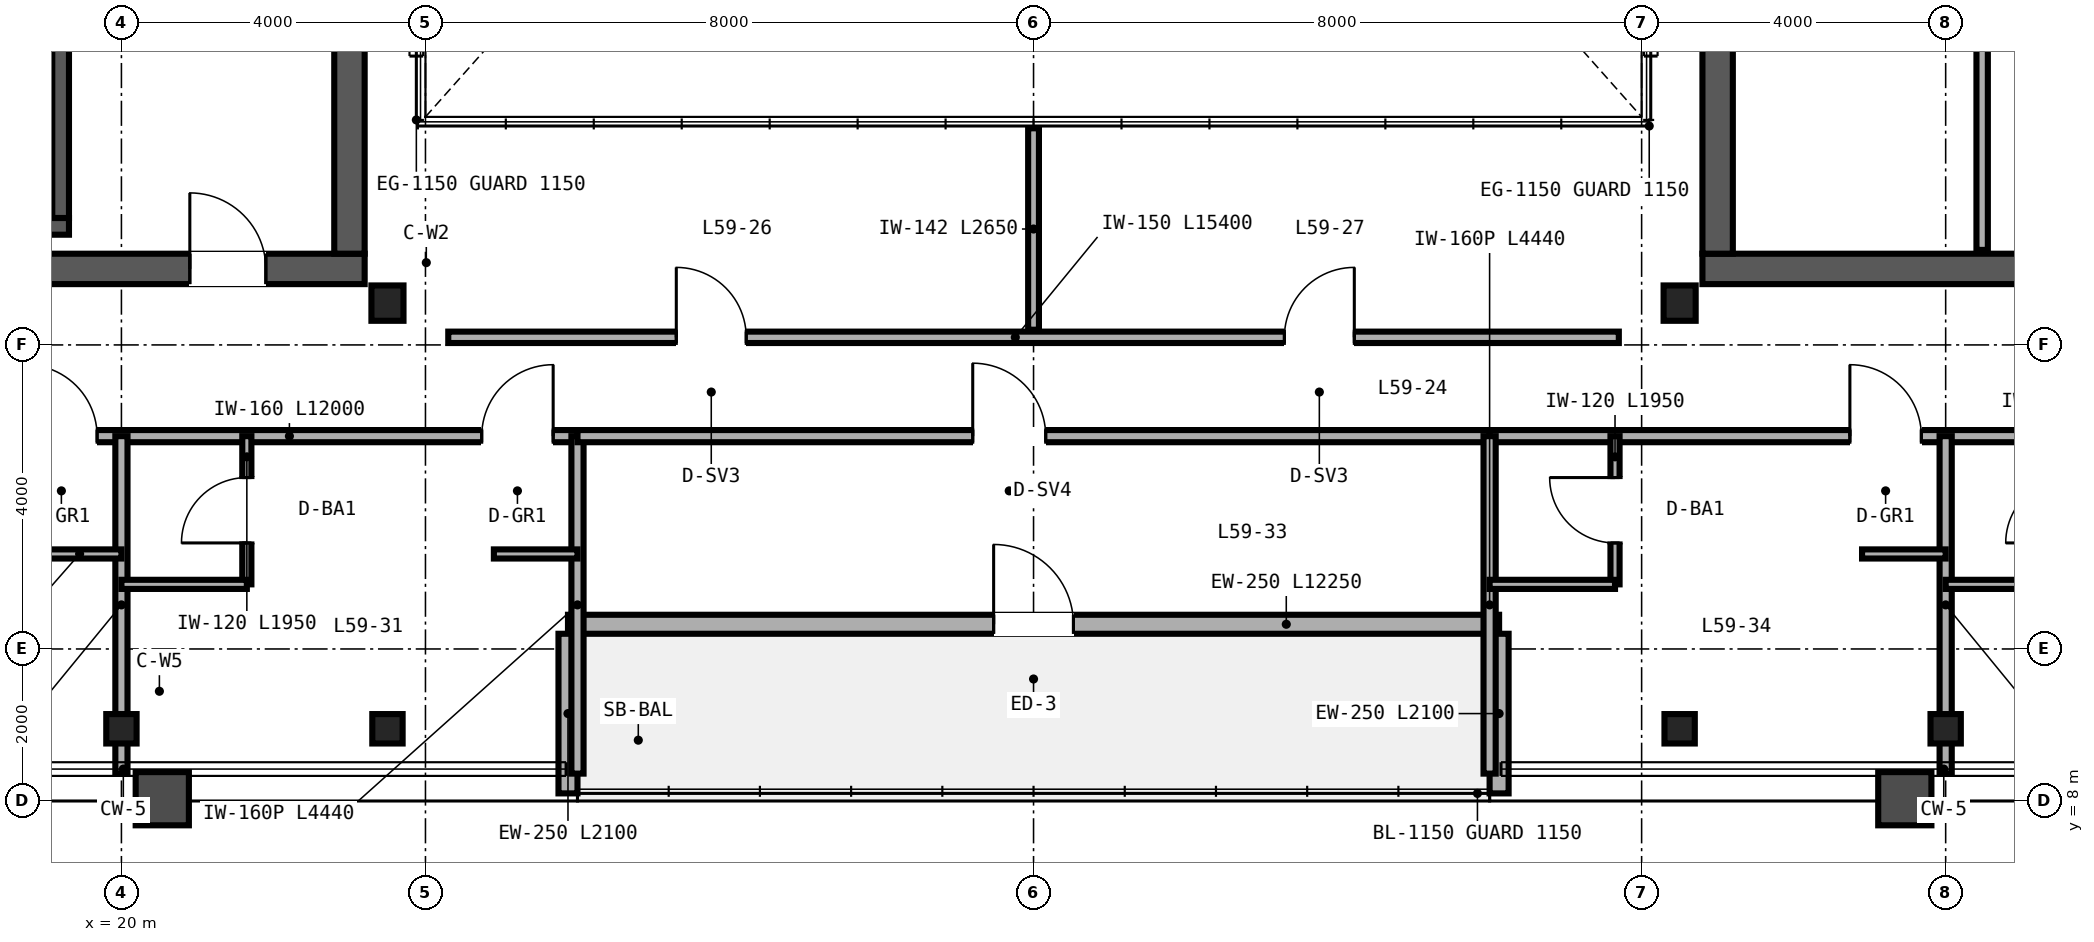
"""IFC4 building model, lengths in metres.
Left out: names, types, materials, properties, quantities, classifications, styles, units other than length and angle.
Written with IfcOpenShell. Run it as: python <this file> out.ifc"""

import sys

from ifc_helpers import new_model, si_unit, direction, frame, frame_2d, origin, origin_2d, place, context, subcontext, project, spatial, rectangle, i_section, extrude, source, transform, mapped, element, fill, save


model = new_model("IFC4")
c1 = context("Model", 3, precision=1e-05, world=origin(), true_north=direction((0.0, 1.0)))
c2 = subcontext(c1, "Body", "Model", "MODEL_VIEW")
j1 = project(units=[si_unit("LENGTHUNIT", "METRE"), si_unit("PLANEANGLEUNIT", "RADIAN")], contexts=[c1])
p1 = place(None, origin())
s1 = spatial("IfcSite", under=j1, at=p1, CompositionType="ELEMENT")
p2 = place(p1, origin())
s2 = spatial("IfcBuilding", under=s1, at=p2, CompositionType="ELEMENT")
p3 = place(p2, frame((0.0, 0.0, 236.4)))
s3 = spatial("IfcBuildingStorey", under=s2, at=p3, CompositionType="ELEMENT", Elevation=236.4)
p4 = place(p3, frame((10.8, 15.0, 0.0), z_axis=(0.0, 0.0, 1.0), x_axis=(1.0, 0.0, 0.0)))
e1 = element("IfcWall", 1, at=p4, inside=s3, PredefinedType="SHEAR", context=c2, shape_type="SweptSolid", body=[
    extrude(rectangle(XDim=12.4, YDim=0.4, at=frame_2d((6.2, 0.0))), origin(), (0.0, 0.0, 1.0), 3.38),
])
p5 = place(p4, frame((10.1, 0.0, 0.0)))
e2 = element("IfcOpeningElement", 2, at=p5, cuts=e1, PredefinedType="OPENING", context=c2, shape_type="SweptSolid", body=[
    extrude(rectangle(XDim=1.0, YDim=2.15, at=frame_2d((0.5, 1.075))), frame((0.0, 0.21, 0.0), z_axis=(0.0, -1.0, 0.0), x_axis=(1.0, 0.0, 0.0)), (0.0, 0.0, 1.0), 0.42),
])
p6 = place(p3, frame((23.0, 15.2, 0.0), z_axis=(0.0, 0.0, 1.0), x_axis=(0.0, 1.0, 0.0)))
e3 = element("IfcWall", 3, at=p6, inside=s3, PredefinedType="SHEAR", context=c2, shape_type="SweptSolid", body=[
    extrude(rectangle(XDim=21.6, YDim=0.4, at=frame_2d((10.8, 0.0))), origin(), (0.0, 0.0, 1.0), 3.38),
])
p7 = place(p3, frame((40.8, 15.0, 0.0), z_axis=(0.0, 0.0, 1.0), x_axis=(1.0, 0.0, 0.0)))
e4 = element("IfcWall", 4, at=p7, inside=s3, PredefinedType="SHEAR", context=c2, shape_type="SweptSolid", body=[
    extrude(rectangle(XDim=12.4, YDim=0.4, at=frame_2d((6.2, 0.0))), origin(), (0.0, 0.0, 1.0), 3.38),
])
p8 = place(p7, frame((4.3, 0.0, 0.0)))
e5 = element("IfcOpeningElement", 5, at=p8, cuts=e4, PredefinedType="OPENING", context=c2, shape_type="SweptSolid", body=[
    extrude(rectangle(XDim=1.0, YDim=2.15, at=frame_2d((0.5, 1.075))), frame((0.0, 0.21, 0.0), z_axis=(0.0, -1.0, 0.0), x_axis=(1.0, 0.0, 0.0)), (0.0, 0.0, 1.0), 0.42),
])
p9 = place(p3, frame((41.0, 15.2, 0.0), z_axis=(0.0, 0.0, 1.0), x_axis=(0.0, 1.0, 0.0)))
e6 = element("IfcWall", 6, at=p9, inside=s3, PredefinedType="SHEAR", context=c2, shape_type="SweptSolid", body=[
    extrude(rectangle(XDim=21.6, YDim=0.4, at=frame_2d((10.8, 0.0))), origin(), (0.0, 0.0, 1.0), 3.38),
])
p10 = place(p3, frame((11.2, 15.56, 0.0), z_axis=(0.0, 0.0, 1.0), x_axis=(1.0, 0.0, 0.0)))
e7 = element("IfcWall", 7, at=p10, inside=s3, PredefinedType="SHEAR", context=c2, shape_type="SweptSolid", body=[
    extrude(rectangle(XDim=8.11, YDim=0.22, at=frame_2d((4.055, 0.0))), origin(), (0.0, 0.0, 1.0), 3.4),
])
p11 = place(p3, frame((19.2, 15.67, 0.0), z_axis=(0.0, 0.0, 1.0), x_axis=(0.0, 1.0, 0.0)))
e8 = element("IfcWall", 8, at=p11, inside=s3, PredefinedType="SHEAR", context=c2, shape_type="SweptSolid", body=[
    extrude(rectangle(XDim=3.28, YDim=0.22, at=frame_2d((1.64, 0.0))), origin(), (0.0, 0.0, 1.0), 3.4),
])
m1 = source(origin(), c2, "Body", "SweptSolid", [
    extrude(i_section(OverallWidth=0.422, OverallDepth=0.465, WebThickness=0.045, FlangeThickness=0.073, FilletRadius=0.025, at=origin_2d()), origin(), (0.0, 0.0, 1.0), 3.38),
])
for number, where, z_axis, x_axis in (
    (9, (23.5, 14.55, 0.0), (0.0, 0.0, 1.0), (1.0, 0.0, 0.0)),
    (10, (40.5, 14.55, 0.0), (0.0, 0.0, 1.0), (1.0, 0.0, 0.0)),
):
    element("IfcColumn", number, at=place(p3, frame(where, z_axis=z_axis, x_axis=x_axis)), inside=s3, PredefinedType="COLUMN", context=c2, shape_type="MappedRepresentation", body=[
        mapped(m1, transform((0.0, 0.0, 0.0), scale=1.0)),
    ])
m2 = source(origin(), c2, "Body", "SweptSolid", [
    extrude(i_section(OverallWidth=0.399, OverallDepth=0.387, WebThickness=0.021, FlangeThickness=0.033, FilletRadius=0.025, at=origin_2d()), origin(), (0.0, 0.0, 1.0), 3.38),
])
for number, where, z_axis, x_axis in (
    (11, (20.0, 8.95, 0.0), (0.0, 0.0, 1.0), (1.0, 0.0, 0.0)),
    (12, (23.5, 8.95, 0.0), (0.0, 0.0, 1.0), (1.0, 0.0, 0.0)),
    (13, (40.5, 8.95, 0.0), (0.0, 0.0, 1.0), (1.0, 0.0, 0.0)),
    (14, (44.0, 8.95, 0.0), (0.0, 0.0, 1.0), (1.0, 0.0, 0.0)),
):
    element("IfcColumn", number, at=place(p3, frame(where, z_axis=z_axis, x_axis=x_axis)), inside=s3, PredefinedType="COLUMN", context=c2, shape_type="MappedRepresentation", body=[
        mapped(m2, transform((0.0, 0.0, 0.0), scale=1.0)),
    ])
p12 = place(p3, frame((25.875, 10.325, 0.0), z_axis=(0.0, 0.0, 1.0), x_axis=(1.0, 0.0, 0.0)))
e15 = element("IfcWall", 15, at=p12, inside=s3, PredefinedType="SOLIDWALL", context=c2, shape_type="SweptSolid", body=[
    extrude(rectangle(XDim=12.25, YDim=0.25, at=frame_2d((6.125, 0.0))), origin(), (0.0, 0.0, 1.0), 3.38),
])
p13 = place(p12, frame((5.6, 0.0, 0.0)))
e16 = element("IfcOpeningElement", 16, at=p13, cuts=e15, PredefinedType="OPENING", context=c2, shape_type="SweptSolid", body=[
    extrude(rectangle(XDim=1.05, YDim=2.15, at=frame_2d((0.525, 1.075))), frame((0.0, 0.135, 0.0), z_axis=(0.0, -1.0, 0.0), x_axis=(1.0, 0.0, 0.0)), (0.0, 0.0, 1.0), 0.27),
])
for number, where, z_axis, x_axis in (
    (17, (25.875, 8.1, 0.0), (0.0, 0.0, 1.0), (0.0, 1.0, 0.0)),
    (18, (38.125, 8.1, 0.0), (0.0, 0.0, 1.0), (0.0, 1.0, 0.0)),
):
    element("IfcWall", number, at=place(p3, frame(where, z_axis=z_axis, x_axis=x_axis)), inside=s3, PredefinedType="SOLIDWALL", context=c2, shape_type="SweptSolid", body=[
        extrude(rectangle(XDim=2.1, YDim=0.25, at=frame_2d((1.05, 0.0))), origin(), (0.0, 0.0, 1.0), 2.453),
    ])
p14 = place(p3, frame((44.48, 15.25, 0.0), z_axis=(0.0, 0.0, 1.0), x_axis=(0.0, 1.0, 0.0)))
e19 = element("IfcWall", 19, at=p14, inside=s3, PredefinedType="PARTITIONING", context=c2, shape_type="SweptSolid", body=[
    extrude(rectangle(XDim=16.13, YDim=0.15, at=frame_2d((8.065, 0.0))), origin(), (0.0, 0.0, 1.0), 2.453),
])
p15 = place(p14, frame((4.5, 0.0, 0.0)))
e20 = element("IfcOpeningElement", 20, at=p15, cuts=e19, PredefinedType="OPENING", context=c2, shape_type="SweptSolid", body=[
    extrude(rectangle(XDim=0.92, YDim=2.15, at=frame_2d((0.46, 1.075))), frame((0.0, 0.085, 0.0), z_axis=(0.0, -1.0, 0.0), x_axis=(1.0, 0.0, 0.0)), (0.0, 0.0, 1.0), 0.17),
])
p16 = place(p3, frame((32.0, 14.2, 0.0), z_axis=(0.0, 0.0, 1.0), x_axis=(0.0, 1.0, 0.0)))
e21 = element("IfcWall", 21, at=p16, inside=s3, PredefinedType="PARTITIONING", context=c2, shape_type="SweptSolid", body=[
    extrude(rectangle(XDim=2.65, YDim=0.142, at=frame_2d((1.325, 0.0))), origin(), (0.0, 0.0, 1.0), 3.38),
])
p17 = place(p3, frame((24.3, 14.1, 0.0), z_axis=(0.0, 0.0, 1.0), x_axis=(1.0, 0.0, 0.0)))
e22 = element("IfcWall", 22, at=p17, inside=s3, PredefinedType="PARTITIONING", context=c2, shape_type="SweptSolid", body=[
    extrude(rectangle(XDim=15.4, YDim=0.15, at=frame_2d((7.7, 0.0))), origin(), (0.0, 0.0, 1.0), 3.38),
])
p18 = place(p17, frame((3.0, 0.0, 0.0)))
e23 = element("IfcOpeningElement", 23, at=p18, cuts=e22, PredefinedType="OPENING", context=c2, shape_type="SweptSolid", body=[
    extrude(rectangle(XDim=0.92, YDim=2.15, at=frame_2d((0.46, 1.075))), frame((0.0, 0.085, 0.0), z_axis=(0.0, -1.0, 0.0), x_axis=(1.0, 0.0, 0.0)), (0.0, 0.0, 1.0), 0.17),
])
p19 = place(p17, frame((11.0, 0.0, 0.0)))
e24 = element("IfcOpeningElement", 24, at=p19, cuts=e22, PredefinedType="OPENING", context=c2, shape_type="SweptSolid", body=[
    extrude(rectangle(XDim=0.92, YDim=2.15, at=frame_2d((0.46, 1.075))), frame((0.0, 0.085, 0.0), z_axis=(0.0, -1.0, 0.0), x_axis=(1.0, 0.0, 0.0)), (0.0, 0.0, 1.0), 0.17),
])
p20 = place(p3, frame((14.0, 12.8, 0.0), z_axis=(0.0, 0.0, 1.0), x_axis=(1.0, 0.0, 0.0)))
e25 = element("IfcWall", 25, at=p20, inside=s3, PredefinedType="PARTITIONING", context=c2, shape_type="SweptSolid", body=[
    extrude(rectangle(XDim=12.0, YDim=0.16, at=frame_2d((6.0, 0.0))), origin(), (0.0, 0.0, 1.0), 2.923),
])
p21 = place(p20, frame((4.74, 0.0, 0.0)))
e26 = element("IfcOpeningElement", 26, at=p21, cuts=e25, PredefinedType="OPENING", context=c2, shape_type="SweptSolid", body=[
    extrude(rectangle(XDim=0.94, YDim=2.15, at=frame_2d((0.47, 1.075))), frame((0.0, 0.09, 0.0), z_axis=(0.0, -1.0, 0.0), x_axis=(1.0, 0.0, 0.0)), (0.0, 0.0, 1.0), 0.18),
])
p22 = place(p20, frame((10.74, 0.0, 0.0)))
e27 = element("IfcOpeningElement", 27, at=p22, cuts=e25, PredefinedType="OPENING", context=c2, shape_type="SweptSolid", body=[
    extrude(rectangle(XDim=0.94, YDim=2.15, at=frame_2d((0.47, 1.075))), frame((0.0, 0.09, 0.0), z_axis=(0.0, -1.0, 0.0), x_axis=(1.0, 0.0, 0.0)), (0.0, 0.0, 1.0), 0.18),
])
p23 = place(p3, frame((26.0, 8.36, 0.0), z_axis=(0.0, 0.0, 1.0), x_axis=(0.0, 1.0, 0.0)))
e28 = element("IfcWall", 28, at=p23, inside=s3, PredefinedType="PARTITIONING", context=c2, shape_type="SweptSolid", body=[
    extrude(rectangle(XDim=4.44, YDim=0.16, at=frame_2d((2.22, 0.0))), origin(), (0.0, 0.0, 1.0), 2.453),
])
p24 = place(p3, frame((20.0, 8.36, 0.0), z_axis=(0.0, 0.0, 1.0), x_axis=(0.0, 1.0, 0.0)))
e29 = element("IfcWall", 29, at=p24, inside=s3, PredefinedType="PARTITIONING", context=c2, shape_type="SweptSolid", body=[
    extrude(rectangle(XDim=4.44, YDim=0.16, at=frame_2d((2.22, 0.0))), origin(), (0.0, 0.0, 1.0), 2.687),
])
p25 = place(p3, frame((18.9, 11.25, 0.0), z_axis=(0.0, 0.0, 1.0), x_axis=(1.0, 0.0, 0.0)))
e30 = element("IfcWall", 30, at=p25, inside=s3, PredefinedType="PARTITIONING", context=c2, shape_type="SweptSolid", body=[
    extrude(rectangle(XDim=1.1, YDim=0.12, at=frame_2d((0.55, 0.0))), origin(), (0.0, 0.0, 1.0), 3.38),
])
p26 = place(p3, frame((21.65, 10.85, 0.0), z_axis=(0.0, 0.0, 1.0), x_axis=(0.0, 1.0, 0.0)))
e31 = element("IfcWall", 31, at=p26, inside=s3, PredefinedType="PARTITIONING", context=c2, shape_type="SweptSolid", body=[
    extrude(rectangle(XDim=1.95, YDim=0.12, at=frame_2d((0.975, 0.0))), origin(), (0.0, 0.0, 1.0), 3.38),
])
p27 = place(p26, frame((0.545, 0.0, 0.0)))
e32 = element("IfcOpeningElement", 32, at=p27, cuts=e31, PredefinedType="OPENING", context=c2, shape_type="SweptSolid", body=[
    extrude(rectangle(XDim=0.86, YDim=2.1, at=frame_2d((0.43, 1.05))), frame((0.0, 0.07, 0.0), z_axis=(0.0, -1.0, 0.0), x_axis=(1.0, 0.0, 0.0)), (0.0, 0.0, 1.0), 0.14),
])
p28 = place(p3, frame((20.0, 10.85, 0.0), z_axis=(0.0, 0.0, 1.0), x_axis=(1.0, 0.0, 0.0)))
e33 = element("IfcWall", 33, at=p28, inside=s3, PredefinedType="PARTITIONING", context=c2, shape_type="SweptSolid", body=[
    extrude(rectangle(XDim=1.65, YDim=0.12, at=frame_2d((0.825, 0.0))), origin(), (0.0, 0.0, 1.0), 3.38),
])
p29 = place(p3, frame((24.9, 11.25, 0.0), z_axis=(0.0, 0.0, 1.0), x_axis=(1.0, 0.0, 0.0)))
e34 = element("IfcWall", 34, at=p29, inside=s3, PredefinedType="PARTITIONING", context=c2, shape_type="SweptSolid", body=[
    extrude(rectangle(XDim=1.1, YDim=0.12, at=frame_2d((0.55, 0.0))), origin(), (0.0, 0.0, 1.0), 3.38),
])
p30 = place(p3, frame((26.0, 12.8, 0.0), z_axis=(0.0, 0.0, 1.0), x_axis=(1.0, 0.0, 0.0)))
e35 = element("IfcWall", 35, at=p30, inside=s3, PredefinedType="PARTITIONING", context=c2, shape_type="SweptSolid", body=[
    extrude(rectangle(XDim=12.0, YDim=0.16, at=frame_2d((6.0, 0.0))), origin(), (0.0, 0.0, 1.0), 3.38),
])
p31 = place(p30, frame((5.2, 0.0, 0.0)))
e36 = element("IfcOpeningElement", 36, at=p31, cuts=e35, PredefinedType="OPENING", context=c2, shape_type="SweptSolid", body=[
    extrude(rectangle(XDim=0.96, YDim=2.15, at=frame_2d((0.48, 1.075))), frame((0.0, 0.09, 0.0), z_axis=(0.0, -1.0, 0.0), x_axis=(1.0, 0.0, 0.0)), (0.0, 0.0, 1.0), 0.18),
])
p32 = place(p3, frame((38.0, 12.8, 0.0), z_axis=(0.0, 0.0, 1.0), x_axis=(1.0, 0.0, 0.0)))
e37 = element("IfcWall", 37, at=p32, inside=s3, PredefinedType="PARTITIONING", context=c2, shape_type="SweptSolid", body=[
    extrude(rectangle(XDim=12.0, YDim=0.16, at=frame_2d((6.0, 0.0))), origin(), (0.0, 0.0, 1.0), 2.923),
])
p33 = place(p32, frame((4.74, 0.0, 0.0)))
e38 = element("IfcOpeningElement", 38, at=p33, cuts=e37, PredefinedType="OPENING", context=c2, shape_type="SweptSolid", body=[
    extrude(rectangle(XDim=0.94, YDim=2.15, at=frame_2d((0.47, 1.075))), frame((0.0, 0.09, 0.0), z_axis=(0.0, -1.0, 0.0), x_axis=(1.0, 0.0, 0.0)), (0.0, 0.0, 1.0), 0.18),
])
p34 = place(p32, frame((10.74, 0.0, 0.0)))
e39 = element("IfcOpeningElement", 39, at=p34, cuts=e37, PredefinedType="OPENING", context=c2, shape_type="SweptSolid", body=[
    extrude(rectangle(XDim=0.94, YDim=2.15, at=frame_2d((0.47, 1.075))), frame((0.0, 0.09, 0.0), z_axis=(0.0, -1.0, 0.0), x_axis=(1.0, 0.0, 0.0)), (0.0, 0.0, 1.0), 0.18),
])
p35 = place(p3, frame((38.0, 8.36, 0.0), z_axis=(0.0, 0.0, 1.0), x_axis=(0.0, 1.0, 0.0)))
e40 = element("IfcWall", 40, at=p35, inside=s3, PredefinedType="PARTITIONING", context=c2, shape_type="SweptSolid", body=[
    extrude(rectangle(XDim=4.44, YDim=0.16, at=frame_2d((2.22, 0.0))), origin(), (0.0, 0.0, 1.0), 2.453),
])
p36 = place(p3, frame((44.0, 8.36, 0.0), z_axis=(0.0, 0.0, 1.0), x_axis=(0.0, 1.0, 0.0)))
e41 = element("IfcWall", 41, at=p36, inside=s3, PredefinedType="PARTITIONING", context=c2, shape_type="SweptSolid", body=[
    extrude(rectangle(XDim=4.44, YDim=0.16, at=frame_2d((2.22, 0.0))), origin(), (0.0, 0.0, 1.0), 2.687),
])
p37 = place(p3, frame((39.65, 10.85, 0.0), z_axis=(0.0, 0.0, 1.0), x_axis=(0.0, 1.0, 0.0)))
e42 = element("IfcWall", 42, at=p37, inside=s3, PredefinedType="PARTITIONING", context=c2, shape_type="SweptSolid", body=[
    extrude(rectangle(XDim=1.95, YDim=0.12, at=frame_2d((0.975, 0.0))), origin(), (0.0, 0.0, 1.0), 3.38),
])
p38 = place(p37, frame((0.545, 0.0, 0.0)))
e43 = element("IfcOpeningElement", 43, at=p38, cuts=e42, PredefinedType="OPENING", context=c2, shape_type="SweptSolid", body=[
    extrude(rectangle(XDim=0.86, YDim=2.1, at=frame_2d((0.43, 1.05))), frame((0.0, 0.07, 0.0), z_axis=(0.0, -1.0, 0.0), x_axis=(1.0, 0.0, 0.0)), (0.0, 0.0, 1.0), 0.14),
])
p39 = place(p3, frame((38.0, 10.85, 0.0), z_axis=(0.0, 0.0, 1.0), x_axis=(1.0, 0.0, 0.0)))
e44 = element("IfcWall", 44, at=p39, inside=s3, PredefinedType="PARTITIONING", context=c2, shape_type="SweptSolid", body=[
    extrude(rectangle(XDim=1.65, YDim=0.12, at=frame_2d((0.825, 0.0))), origin(), (0.0, 0.0, 1.0), 3.38),
])
p40 = place(p3, frame((42.9, 11.25, 0.0), z_axis=(0.0, 0.0, 1.0), x_axis=(1.0, 0.0, 0.0)))
e45 = element("IfcWall", 45, at=p40, inside=s3, PredefinedType="PARTITIONING", context=c2, shape_type="SweptSolid", body=[
    extrude(rectangle(XDim=1.1, YDim=0.12, at=frame_2d((0.55, 0.0))), origin(), (0.0, 0.0, 1.0), 3.38),
])
p41 = place(p3, frame((44.0, 10.85, 0.0), z_axis=(0.0, 0.0, 1.0), x_axis=(1.0, 0.0, 0.0)))
e46 = element("IfcWall", 46, at=p41, inside=s3, PredefinedType="PARTITIONING", context=c2, shape_type="SweptSolid", body=[
    extrude(rectangle(XDim=1.65, YDim=0.12, at=frame_2d((0.825, 0.0))), origin(), (0.0, 0.0, 1.0), 3.38),
])
m3 = source(origin(), c2, "Body", "SweptSolid", [
    extrude(rectangle(XDim=1.05, YDim=2.15, at=frame_2d((0.525, 1.075))), frame((0.0, 0.025, 0.0), z_axis=(0.0, -1.0, 0.0), x_axis=(1.0, 0.0, 0.0)), (0.0, 0.0, 1.0), 0.05),
])
p42 = place(p13, origin())
e47 = element("IfcDoor", 47, at=p42, inside=s3, OperationType="SINGLE_SWING_LEFT", PredefinedType="DOOR", context=c2, shape_type="MappedRepresentation", body=[
    mapped(m3, transform((0.0, 0.0, 0.0), scale=1.0)),
])
fill(e16, e47)
m4 = source(origin(), c2, "Body", "SweptSolid", [
    extrude(rectangle(XDim=1.0, YDim=2.15, at=frame_2d((0.5, 1.075))), frame((0.0, 0.025, 0.0), z_axis=(0.0, -1.0, 0.0), x_axis=(1.0, 0.0, 0.0)), (0.0, 0.0, 1.0), 0.05),
])
p43 = place(p5, origin())
e48 = element("IfcDoor", 48, at=p43, inside=s3, OperationType="SINGLE_SWING_LEFT", PredefinedType="DOOR", context=c2, shape_type="MappedRepresentation", body=[
    mapped(m4, transform((0.0, 0.0, 0.0), scale=1.0)),
])
fill(e2, e48)
m5 = source(origin(), c2, "Body", "SweptSolid", [
    extrude(rectangle(XDim=0.92, YDim=2.15, at=frame_2d((0.46, 1.075))), frame((0.0, 0.025, 0.0), z_axis=(0.0, -1.0, 0.0), x_axis=(1.0, 0.0, 0.0)), (0.0, 0.0, 1.0), 0.05),
])
p44 = place(p18, origin())
e49 = element("IfcDoor", 49, at=p44, inside=s3, OperationType="SINGLE_SWING_LEFT", PredefinedType="DOOR", context=c2, shape_type="MappedRepresentation", body=[
    mapped(m5, transform((0.0, 0.0, 0.0), scale=1.0)),
])
fill(e23, e49)
p45 = place(p19, origin())
e50 = element("IfcDoor", 50, at=p45, inside=s3, OperationType="SINGLE_SWING_RIGHT", PredefinedType="DOOR", context=c2, shape_type="MappedRepresentation", body=[
    mapped(m5, transform((0.0, 0.0, 0.0), scale=1.0)),
])
fill(e24, e50)
m6 = source(origin(), c2, "Body", "SweptSolid", [
    extrude(rectangle(XDim=0.86, YDim=2.1, at=frame_2d((0.43, 1.05))), frame((0.0, 0.025, 0.0), z_axis=(0.0, -1.0, 0.0), x_axis=(1.0, 0.0, 0.0)), (0.0, 0.0, 1.0), 0.05),
])
p46 = place(p27, origin())
e51 = element("IfcDoor", 51, at=p46, inside=s3, OperationType="SINGLE_SWING_LEFT", PredefinedType="DOOR", context=c2, shape_type="MappedRepresentation", body=[
    mapped(m6, transform((0.0, 0.0, 0.0), scale=1.0)),
])
fill(e32, e51)
m7 = source(origin(), c2, "Body", "SweptSolid", [
    extrude(rectangle(XDim=0.94, YDim=2.15, at=frame_2d((0.47, 1.075))), frame((0.0, 0.025, 0.0), z_axis=(0.0, -1.0, 0.0), x_axis=(1.0, 0.0, 0.0)), (0.0, 0.0, 1.0), 0.05),
])
p47 = place(p21, origin())
e52 = element("IfcDoor", 52, at=p47, inside=s3, OperationType="SINGLE_SWING_LEFT", PredefinedType="DOOR", context=c2, shape_type="MappedRepresentation", body=[
    mapped(m7, transform((0.0, 0.0, 0.0), scale=1.0)),
])
fill(e26, e52)
p48 = place(p22, origin())
e53 = element("IfcDoor", 53, at=p48, inside=s3, OperationType="SINGLE_SWING_RIGHT", PredefinedType="DOOR", context=c2, shape_type="MappedRepresentation", body=[
    mapped(m7, transform((0.0, 0.0, 0.0), scale=1.0)),
])
fill(e27, e53)
m8 = source(origin(), c2, "Body", "SweptSolid", [
    extrude(rectangle(XDim=0.96, YDim=2.15, at=frame_2d((0.48, 1.075))), frame((0.0, 0.025, 0.0), z_axis=(0.0, -1.0, 0.0), x_axis=(1.0, 0.0, 0.0)), (0.0, 0.0, 1.0), 0.05),
])
p49 = place(p31, origin())
e54 = element("IfcDoor", 54, at=p49, inside=s3, OperationType="SINGLE_SWING_LEFT", PredefinedType="DOOR", context=c2, shape_type="MappedRepresentation", body=[
    mapped(m8, transform((0.0, 0.0, 0.0), scale=1.0)),
])
fill(e36, e54)
p50 = place(p38, origin())
e55 = element("IfcDoor", 55, at=p50, inside=s3, OperationType="SINGLE_SWING_RIGHT", PredefinedType="DOOR", context=c2, shape_type="MappedRepresentation", body=[
    mapped(m6, transform((0.0, 0.0, 0.0), scale=1.0)),
])
fill(e43, e55)
p51 = place(p33, origin())
e56 = element("IfcDoor", 56, at=p51, inside=s3, OperationType="SINGLE_SWING_LEFT", PredefinedType="DOOR", context=c2, shape_type="MappedRepresentation", body=[
    mapped(m7, transform((0.0, 0.0, 0.0), scale=1.0)),
])
fill(e38, e56)
save(model, sys.argv[1])
